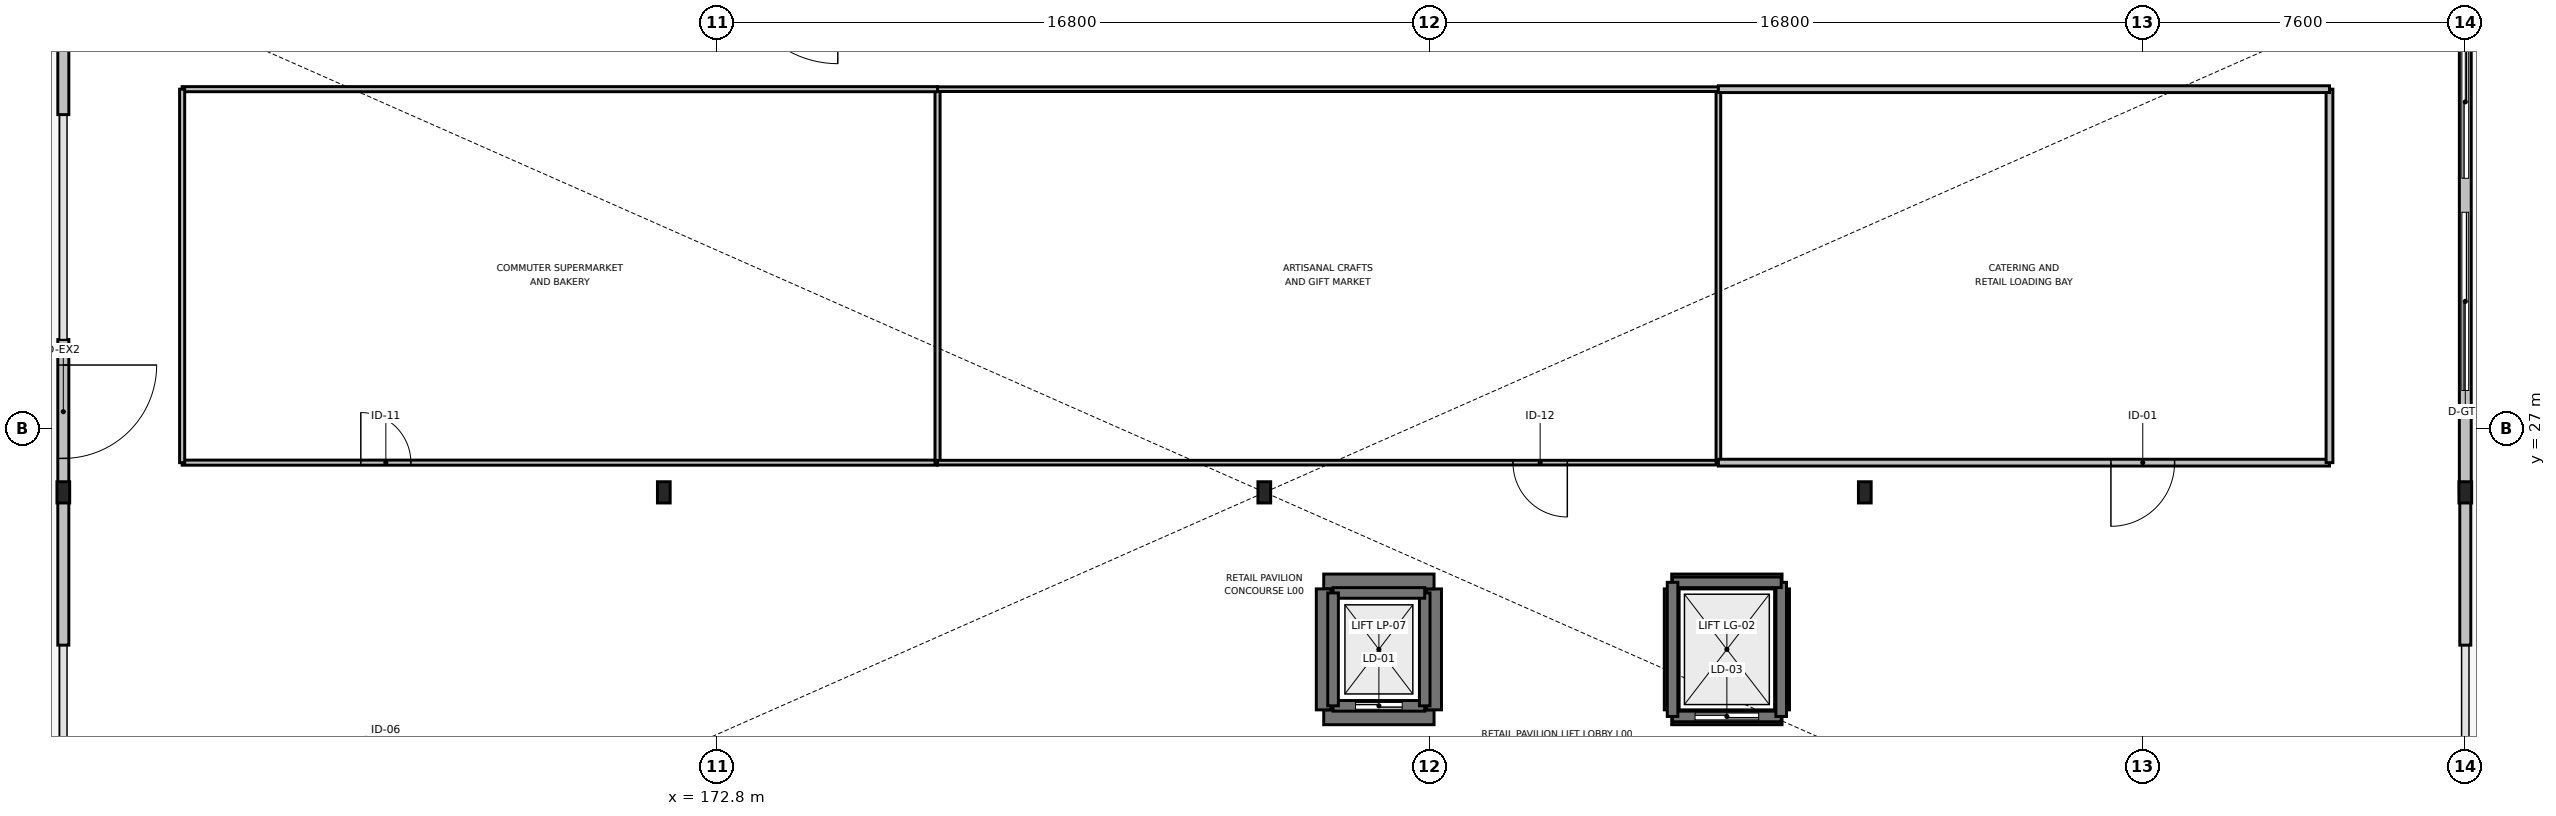
"""IFC4 building model, lengths in metres.
Left out: names, types, materials, properties, quantities, classifications, styles, units other than length and angle.
Written with IfcOpenShell. Run it as: python <this file> out.ifc"""

import sys

from ifc_helpers import new_model, si_unit, direction, frame, frame_2d, origin, origin_2d, place, context, subcontext, project, spatial, rectangle, i_section, extrude, element, fill, save


model = new_model("IFC4")
c1 = context("Model", 3, precision=1e-05, world=origin(), true_north=direction((0.0, 1.0)))
c2 = subcontext(c1, "Body", "Model", "MODEL_VIEW")
j1 = project(units=[si_unit("LENGTHUNIT", "METRE"), si_unit("PLANEANGLEUNIT", "RADIAN")], contexts=[c1])
p1 = place(None, origin())
s1 = spatial("IfcSite", under=j1, at=p1, CompositionType="ELEMENT")
p2 = place(p1, origin())
s2 = spatial("IfcBuilding", under=s1, at=p2, CompositionType="ELEMENT")
p3 = place(p2, origin())
s3 = spatial("IfcBuildingStorey", under=s2, at=p3, CompositionType="ELEMENT", Elevation=0.0)
for number, where, z_axis, x_axis in (
    (1, (157.4, 25.5, 0.0), (0.0, 0.0, 1.0), (1.0, 0.0, 0.0)),
    (2, (171.55, 25.5, 0.0), (0.0, 0.0, 1.0), (1.0, 0.0, 0.0)),
    (3, (185.7, 25.5, 0.0), (0.0, 0.0, 1.0), (1.0, 0.0, 0.0)),
    (4, (199.85, 25.5, 0.0), (0.0, 0.0, 1.0), (1.0, 0.0, 0.0)),
    (5, (214.0, 25.5, 0.0), (0.0, 0.0, 1.0), (1.0, 0.0, 0.0)),
):
    element("IfcColumn", number, at=place(p3, frame(where, z_axis=z_axis, x_axis=x_axis)), inside=s3, PredefinedType="COLUMN", context=c2, shape_type="SweptSolid", body=[
        extrude(i_section(OverallWidth=0.3, OverallDepth=0.5, WebThickness=0.014, FlangeThickness=0.028, FilletRadius=0.027, at=origin_2d()), origin(), (0.0, 0.0, 1.0), 5.4),
    ])
p4 = place(p3, frame((187.1, 20.2, -1.35), z_axis=(0.0, 0.0, 1.0), x_axis=(1.0, 0.0, 0.0)))
e6 = element("IfcWall", 6, at=p4, inside=s3, PredefinedType="SOLIDWALL", context=c2, shape_type="SweptSolid", body=[
    extrude(rectangle(XDim=2.6, YDim=0.35, at=frame_2d((1.3, 0.0))), origin(), (0.0, 0.0, 1.0), 1.35),
])
p5 = place(p3, frame((189.7, 20.375, -1.35), z_axis=(0.0, 0.0, 1.0), x_axis=(0.0, 1.0, 0.0)))
e7 = element("IfcWall", 7, at=p5, inside=s3, PredefinedType="SOLIDWALL", context=c2, shape_type="SweptSolid", body=[
    extrude(rectangle(XDim=2.85, YDim=0.35, at=frame_2d((1.425, 0.0))), origin(), (0.0, 0.0, 1.0), 1.35),
])
p6 = place(p3, frame((189.7, 23.4, -1.35), z_axis=(0.0, 0.0, 1.0), x_axis=(-1.0, 0.0, 0.0)))
e8 = element("IfcWall", 8, at=p6, inside=s3, PredefinedType="SOLIDWALL", context=c2, shape_type="SweptSolid", body=[
    extrude(rectangle(XDim=2.6, YDim=0.35, at=frame_2d((1.3, 0.0))), origin(), (0.0, 0.0, 1.0), 1.35),
])
p7 = place(p3, frame((187.1, 23.225, -1.35), z_axis=(0.0, 0.0, 1.0), x_axis=(0.0, -1.0, 0.0)))
e9 = element("IfcWall", 9, at=p7, inside=s3, PredefinedType="SOLIDWALL", context=c2, shape_type="SweptSolid", body=[
    extrude(rectangle(XDim=2.85, YDim=0.35, at=frame_2d((1.425, 0.0))), origin(), (0.0, 0.0, 1.0), 1.35),
])
p8 = place(p3, frame((195.3, 20.2, -1.35), z_axis=(0.0, 0.0, 1.0), x_axis=(1.0, 0.0, 0.0)))
e10 = element("IfcWall", 10, at=p8, inside=s3, PredefinedType="SOLIDWALL", context=c2, shape_type="SweptSolid", body=[
    extrude(rectangle(XDim=2.6, YDim=0.35, at=frame_2d((1.3, 0.0))), origin(), (0.0, 0.0, 1.0), 1.35),
])
p9 = place(p3, frame((197.9, 20.375, -1.35), z_axis=(0.0, 0.0, 1.0), x_axis=(0.0, 1.0, 0.0)))
e11 = element("IfcWall", 11, at=p9, inside=s3, PredefinedType="SOLIDWALL", context=c2, shape_type="SweptSolid", body=[
    extrude(rectangle(XDim=2.85, YDim=0.35, at=frame_2d((1.425, 0.0))), origin(), (0.0, 0.0, 1.0), 1.35),
])
p10 = place(p3, frame((197.9, 23.4, -1.35), z_axis=(0.0, 0.0, 1.0), x_axis=(-1.0, 0.0, 0.0)))
e12 = element("IfcWall", 12, at=p10, inside=s3, PredefinedType="SOLIDWALL", context=c2, shape_type="SweptSolid", body=[
    extrude(rectangle(XDim=2.6, YDim=0.35, at=frame_2d((1.3, 0.0))), origin(), (0.0, 0.0, 1.0), 1.35),
])
p11 = place(p3, frame((195.3, 23.225, -1.35), z_axis=(0.0, 0.0, 1.0), x_axis=(0.0, -1.0, 0.0)))
e13 = element("IfcWall", 13, at=p11, inside=s3, PredefinedType="SOLIDWALL", context=c2, shape_type="SweptSolid", body=[
    extrude(rectangle(XDim=2.85, YDim=0.35, at=frame_2d((1.425, 0.0))), origin(), (0.0, 0.0, 1.0), 1.35),
])
p12 = place(p3, frame((157.4, 21.9, 0.0), z_axis=(0.0, 0.0, 1.0), x_axis=(0.0, 1.0, 0.0)))
e14 = element("IfcWall", 14, at=p12, inside=s3, PredefinedType="STANDARD", context=c2, shape_type="SweptSolid", body=[
    extrude(rectangle(XDim=3.6, YDim=0.26, at=frame_2d((1.8, 0.0))), origin(), (0.0, 0.0, 1.0), 4.675),
])
p13 = place(p3, frame((157.4, 25.5, 0.0), z_axis=(0.0, 0.0, 1.0), x_axis=(0.0, 1.0, 0.0)))
e15 = element("IfcWall", 15, at=p13, inside=s3, PredefinedType="STANDARD", context=c2, shape_type="SweptSolid", body=[
    extrude(rectangle(XDim=3.6, YDim=0.26, at=frame_2d((1.8, 0.0))), origin(), (0.0, 0.0, 1.0), 4.675),
])
p14 = place(p13, frame((0.8, 0.0, 0.0)))
e16 = element("IfcOpeningElement", 16, at=p14, cuts=e15, PredefinedType="OPENING", context=c2, shape_type="SweptSolid", body=[
    extrude(rectangle(XDim=2.2, YDim=2.4, at=frame_2d((1.1, 1.2))), frame((0.0, 0.14, 0.0), z_axis=(0.0, -1.0, 0.0), x_axis=(1.0, 0.0, 0.0)), (0.0, 0.0, 1.0), 0.28),
])
p15 = place(p3, frame((157.4, 34.4, 0.0), z_axis=(0.0, 0.0, 1.0), x_axis=(0.0, 1.0, 0.0)))
e17 = element("IfcWall", 17, at=p15, inside=s3, PredefinedType="STANDARD", context=c2, shape_type="SweptSolid", body=[
    extrude(rectangle(XDim=3.47, YDim=0.26, at=frame_2d((1.735, 0.0))), origin(), (0.0, 0.0, 1.0), 4.675),
])
p16 = place(p3, frame((214.0, 21.9, 0.0), z_axis=(0.0, 0.0, 1.0), x_axis=(0.0, 1.0, 0.0)))
e18 = element("IfcWall", 18, at=p16, inside=s3, PredefinedType="STANDARD", context=c2, shape_type="SweptSolid", body=[
    extrude(rectangle(XDim=3.6, YDim=0.26, at=frame_2d((1.8, 0.0))), origin(), (0.0, 0.0, 1.0), 4.675),
])
p17 = place(p3, frame((214.0, 25.5, 0.0), z_axis=(0.0, 0.0, 1.0), x_axis=(0.0, 1.0, 0.0)))
e19 = element("IfcWall", 19, at=p17, inside=s3, PredefinedType="STANDARD", context=c2, shape_type="SweptSolid", body=[
    extrude(rectangle(XDim=12.37, YDim=0.28, at=frame_2d((6.185, 0.0))), origin(), (0.0, 0.0, 1.0), 4.675),
])
p18 = place(p17, frame((6.6, 0.0, 0.0), z_axis=(0.0, 0.0, 1.0), x_axis=(-1.0, 0.0, 0.0)))
e20 = element("IfcOpeningElement", 20, at=p18, cuts=e19, PredefinedType="OPENING", context=c2, shape_type="SweptSolid", body=[
    extrude(rectangle(XDim=4.2, YDim=4.0, at=frame_2d((2.1, 2.0))), frame((0.0, 0.15, 0.0), z_axis=(0.0, -1.0, 0.0), x_axis=(1.0, 0.0, 0.0)), (0.0, 0.0, 1.0), 0.3),
])
p19 = place(p17, frame((11.0, 0.0, 0.0), z_axis=(0.0, 0.0, 1.0), x_axis=(-1.0, 0.0, 0.0)))
e21 = element("IfcOpeningElement", 21, at=p19, cuts=e19, PredefinedType="OPENING", context=c2, shape_type="SweptSolid", body=[
    extrude(rectangle(XDim=3.6, YDim=3.4, at=frame_2d((1.8, 1.7))), frame((0.0, 0.15, 0.0), z_axis=(0.0, -1.0, 0.0), x_axis=(1.0, 0.0, 0.0)), (0.0, 0.0, 1.0), 0.3),
])
p20 = place(p3, frame((187.32, 20.47, 0.0), z_axis=(0.0, 0.0, 1.0), x_axis=(1.0, 0.0, 0.0)))
e22 = element("IfcWall", 22, at=p20, inside=s3, PredefinedType="SHEAR", context=c2, shape_type="SweptSolid", body=[
    extrude(rectangle(XDim=2.16, YDim=0.25, at=frame_2d((1.08, 0.0))), origin(), (0.0, 0.0, 1.0), 5.18),
])
p21 = place(p20, frame((0.53, 0.0, 0.0)))
e23 = element("IfcOpeningElement", 23, at=p21, cuts=e22, PredefinedType="OPENING", context=c2, shape_type="SweptSolid", body=[
    extrude(rectangle(XDim=1.1, YDim=2.2, at=frame_2d((0.55, 1.1))), frame((0.0, 0.135, 0.0), z_axis=(0.0, -1.0, 0.0), x_axis=(1.0, 0.0, 0.0)), (0.0, 0.0, 1.0), 0.27),
])
p22 = place(p3, frame((189.48, 20.47, 0.0), z_axis=(0.0, 0.0, 1.0), x_axis=(0.0, 1.0, 0.0)))
e24 = element("IfcWall", 24, at=p22, inside=s3, PredefinedType="SHEAR", context=c2, shape_type="SweptSolid", body=[
    extrude(rectangle(XDim=2.66, YDim=0.25, at=frame_2d((1.33, 0.0))), origin(), (0.0, 0.0, 1.0), 5.18),
])
p23 = place(p3, frame((189.48, 23.13, 0.0), z_axis=(0.0, 0.0, 1.0), x_axis=(-1.0, 0.0, 0.0)))
e25 = element("IfcWall", 25, at=p23, inside=s3, PredefinedType="SHEAR", context=c2, shape_type="SweptSolid", body=[
    extrude(rectangle(XDim=2.16, YDim=0.25, at=frame_2d((1.08, 0.0))), origin(), (0.0, 0.0, 1.0), 5.18),
])
p24 = place(p3, frame((187.32, 23.13, 0.0), z_axis=(0.0, 0.0, 1.0), x_axis=(0.0, -1.0, 0.0)))
e26 = element("IfcWall", 26, at=p24, inside=s3, PredefinedType="SHEAR", context=c2, shape_type="SweptSolid", body=[
    extrude(rectangle(XDim=2.66, YDim=0.25, at=frame_2d((1.33, 0.0))), origin(), (0.0, 0.0, 1.0), 5.18),
])
p25 = place(p3, frame((195.32, 20.22, 0.0), z_axis=(0.0, 0.0, 1.0), x_axis=(1.0, 0.0, 0.0)))
e27 = element("IfcWall", 27, at=p25, inside=s3, PredefinedType="SHEAR", context=c2, shape_type="SweptSolid", body=[
    extrude(rectangle(XDim=2.56, YDim=0.25, at=frame_2d((1.28, 0.0))), origin(), (0.0, 0.0, 1.0), 5.18),
])
p26 = place(p25, frame((0.53, 0.0, 0.0)))
e28 = element("IfcOpeningElement", 28, at=p26, cuts=e27, PredefinedType="OPENING", context=c2, shape_type="SweptSolid", body=[
    extrude(rectangle(XDim=1.5, YDim=2.3, at=frame_2d((0.75, 1.15))), frame((0.0, 0.135, 0.0), z_axis=(0.0, -1.0, 0.0), x_axis=(1.0, 0.0, 0.0)), (0.0, 0.0, 1.0), 0.27),
])
p27 = place(p3, frame((197.88, 20.22, 0.0), z_axis=(0.0, 0.0, 1.0), x_axis=(0.0, 1.0, 0.0)))
e29 = element("IfcWall", 29, at=p27, inside=s3, PredefinedType="SHEAR", context=c2, shape_type="SweptSolid", body=[
    extrude(rectangle(XDim=3.16, YDim=0.25, at=frame_2d((1.58, 0.0))), origin(), (0.0, 0.0, 1.0), 5.18),
])
p28 = place(p3, frame((197.88, 23.38, 0.0), z_axis=(0.0, 0.0, 1.0), x_axis=(-1.0, 0.0, 0.0)))
e30 = element("IfcWall", 30, at=p28, inside=s3, PredefinedType="SHEAR", context=c2, shape_type="SweptSolid", body=[
    extrude(rectangle(XDim=2.56, YDim=0.25, at=frame_2d((1.28, 0.0))), origin(), (0.0, 0.0, 1.0), 5.18),
])
p29 = place(p3, frame((195.32, 23.38, 0.0), z_axis=(0.0, 0.0, 1.0), x_axis=(0.0, -1.0, 0.0)))
e31 = element("IfcWall", 31, at=p29, inside=s3, PredefinedType="SHEAR", context=c2, shape_type="SweptSolid", body=[
    extrude(rectangle(XDim=3.16, YDim=0.25, at=frame_2d((1.58, 0.0))), origin(), (0.0, 0.0, 1.0), 5.18),
])
p30 = place(p3, frame((160.2, 26.2, 0.0), z_axis=(0.0, 0.0, 1.0), x_axis=(1.0, 0.0, 0.0)))
e32 = element("IfcWall", 32, at=p30, inside=s3, PredefinedType="PARTITIONING", context=c2, shape_type="SweptSolid", body=[
    extrude(rectangle(XDim=17.8, YDim=0.12, at=frame_2d((8.9, 0.0))), origin(), (0.0, 0.0, 1.0), 4.625),
])
p31 = place(p30, frame((4.21, 0.0, 0.0)))
e33 = element("IfcOpeningElement", 33, at=p31, cuts=e32, PredefinedType="OPENING", context=c2, shape_type="SweptSolid", body=[
    extrude(rectangle(XDim=1.18, YDim=2.18, at=frame_2d((0.59, 1.09))), frame((0.0, 0.07, 0.0), z_axis=(0.0, -1.0, 0.0), x_axis=(1.0, 0.0, 0.0)), (0.0, 0.0, 1.0), 0.14),
])
p32 = place(p3, frame((178.0, 26.2, 0.0), z_axis=(0.0, 0.0, 1.0), x_axis=(0.0, 1.0, 0.0)))
e34 = element("IfcWall", 34, at=p32, inside=s3, PredefinedType="PARTITIONING", context=c2, shape_type="SweptSolid", body=[
    extrude(rectangle(XDim=8.8, YDim=0.12, at=frame_2d((4.4, 0.0))), origin(), (0.0, 0.0, 1.0), 5.16),
])
p33 = place(p3, frame((178.0, 35.0, 0.0), z_axis=(0.0, 0.0, 1.0), x_axis=(-1.0, 0.0, 0.0)))
e35 = element("IfcWall", 35, at=p33, inside=s3, PredefinedType="PARTITIONING", context=c2, shape_type="SweptSolid", body=[
    extrude(rectangle(XDim=17.8, YDim=0.12, at=frame_2d((8.9, 0.0))), origin(), (0.0, 0.0, 1.0), 5.16),
])
p34 = place(p3, frame((160.2, 35.0, 0.0), z_axis=(0.0, 0.0, 1.0), x_axis=(0.0, -1.0, 0.0)))
e36 = element("IfcWall", 36, at=p34, inside=s3, PredefinedType="PARTITIONING", context=c2, shape_type="SweptSolid", body=[
    extrude(rectangle(XDim=8.8, YDim=0.12, at=frame_2d((4.4, 0.0))), origin(), (0.0, 0.0, 1.0), 5.16),
])
p35 = place(p3, frame((178.0, 26.2, 0.0), z_axis=(0.0, 0.0, 1.0), x_axis=(1.0, 0.0, 0.0)))
e37 = element("IfcWall", 37, at=p35, inside=s3, PredefinedType="MOVABLE", context=c2, shape_type="SweptSolid", body=[
    extrude(rectangle(XDim=18.4, YDim=0.11, at=frame_2d((9.2, 0.0))), origin(), (0.0, 0.0, 1.0), 4.625),
])
p36 = place(p35, frame((13.56, 0.0, 0.0)))
e38 = element("IfcOpeningElement", 38, at=p36, cuts=e37, PredefinedType="OPENING", context=c2, shape_type="SweptSolid", body=[
    extrude(rectangle(XDim=1.28, YDim=2.22, at=frame_2d((0.64, 1.11))), frame((0.0, 0.065, 0.0), z_axis=(0.0, -1.0, 0.0), x_axis=(1.0, 0.0, 0.0)), (0.0, 0.0, 1.0), 0.13),
])
p37 = place(p3, frame((196.4, 26.2, 0.0), z_axis=(0.0, 0.0, 1.0), x_axis=(0.0, 1.0, 0.0)))
e39 = element("IfcWall", 39, at=p37, inside=s3, PredefinedType="MOVABLE", context=c2, shape_type="SweptSolid", body=[
    extrude(rectangle(XDim=8.8, YDim=0.11, at=frame_2d((4.4, 0.0))), origin(), (0.0, 0.0, 1.0), 5.16),
])
p38 = place(p3, frame((196.4, 35.0, 0.0), z_axis=(0.0, 0.0, 1.0), x_axis=(-1.0, 0.0, 0.0)))
e40 = element("IfcWall", 40, at=p38, inside=s3, PredefinedType="MOVABLE", context=c2, shape_type="SweptSolid", body=[
    extrude(rectangle(XDim=18.4, YDim=0.11, at=frame_2d((9.2, 0.0))), origin(), (0.0, 0.0, 1.0), 5.16),
])
p39 = place(p3, frame((196.4, 26.2, 0.0), z_axis=(0.0, 0.0, 1.0), x_axis=(1.0, 0.0, 0.0)))
e41 = element("IfcWall", 41, at=p39, inside=s3, PredefinedType="PARTITIONING", context=c2, shape_type="SweptSolid", body=[
    extrude(rectangle(XDim=14.4, YDim=0.16, at=frame_2d((7.2, 0.0))), origin(), (0.0, 0.0, 1.0), 4.625),
])
p40 = place(p39, frame((10.75, 0.0, 0.0), z_axis=(0.0, 0.0, 1.0), x_axis=(-1.0, 0.0, 0.0)))
e42 = element("IfcOpeningElement", 42, at=p40, cuts=e41, PredefinedType="OPENING", context=c2, shape_type="SweptSolid", body=[
    extrude(rectangle(XDim=1.5, YDim=2.25, at=frame_2d((0.75, 1.125))), frame((0.0, 0.09, 0.0), z_axis=(0.0, -1.0, 0.0), x_axis=(1.0, 0.0, 0.0)), (0.0, 0.0, 1.0), 0.18),
])
p41 = place(p3, frame((210.8, 26.2, 0.0), z_axis=(0.0, 0.0, 1.0), x_axis=(0.0, 1.0, 0.0)))
e43 = element("IfcWall", 43, at=p41, inside=s3, PredefinedType="PARTITIONING", context=c2, shape_type="SweptSolid", body=[
    extrude(rectangle(XDim=8.8, YDim=0.16, at=frame_2d((4.4, 0.0))), origin(), (0.0, 0.0, 1.0), 5.16),
])
p42 = place(p3, frame((210.8, 35.0, 0.0), z_axis=(0.0, 0.0, 1.0), x_axis=(-1.0, 0.0, 0.0)))
e44 = element("IfcWall", 44, at=p42, inside=s3, PredefinedType="PARTITIONING", context=c2, shape_type="SweptSolid", body=[
    extrude(rectangle(XDim=14.4, YDim=0.16, at=frame_2d((7.2, 0.0))), origin(), (0.0, 0.0, 1.0), 5.16),
])
p43 = place(p14, origin())
e45 = element("IfcDoor", 45, at=p43, inside=s3, OperationType="SINGLE_SWING_RIGHT", PredefinedType="DOOR", context=c2, shape_type="SweptSolid", body=[
    extrude(rectangle(XDim=2.2, YDim=2.4, at=frame_2d((1.1, 1.2))), frame((0.0, 0.025, 0.0), z_axis=(0.0, -1.0, 0.0), x_axis=(1.0, 0.0, 0.0)), (0.0, 0.0, 1.0), 0.05),
])
fill(e16, e45)
p44 = place(p18, origin())
e46 = element("IfcDoor", 46, at=p44, inside=s3, OperationType="ROLLINGUP", PredefinedType="GATE", context=c2, shape_type="SweptSolid", body=[
    extrude(rectangle(XDim=4.2, YDim=4.0, at=frame_2d((2.1, 2.0))), frame((0.0, 0.025, 0.0), z_axis=(0.0, -1.0, 0.0), x_axis=(1.0, 0.0, 0.0)), (0.0, 0.0, 1.0), 0.05),
])
fill(e20, e46)
p45 = place(p19, origin())
e47 = element("IfcDoor", 47, at=p45, inside=s3, OperationType="ROLLINGUP", PredefinedType="GATE", context=c2, shape_type="SweptSolid", body=[
    extrude(rectangle(XDim=3.6, YDim=3.4, at=frame_2d((1.8, 1.7))), frame((0.0, 0.025, 0.0), z_axis=(0.0, -1.0, 0.0), x_axis=(1.0, 0.0, 0.0)), (0.0, 0.0, 1.0), 0.05),
])
fill(e21, e47)
p46 = place(p21, origin())
e48 = element("IfcDoor", 48, at=p46, inside=s3, OperationType="SLIDING_TO_LEFT", PredefinedType="DOOR", context=c2, shape_type="SweptSolid", body=[
    extrude(rectangle(XDim=1.1, YDim=2.2, at=frame_2d((0.55, 1.1))), frame((0.0, 0.025, 0.0), z_axis=(0.0, -1.0, 0.0), x_axis=(1.0, 0.0, 0.0)), (0.0, 0.0, 1.0), 0.05),
])
fill(e23, e48)
p47 = place(p26, origin())
e49 = element("IfcDoor", 49, at=p47, inside=s3, OperationType="SLIDING_TO_LEFT", PredefinedType="DOOR", context=c2, shape_type="SweptSolid", body=[
    extrude(rectangle(XDim=1.5, YDim=2.3, at=frame_2d((0.75, 1.15))), frame((0.0, 0.025, 0.0), z_axis=(0.0, -1.0, 0.0), x_axis=(1.0, 0.0, 0.0)), (0.0, 0.0, 1.0), 0.05),
])
fill(e28, e49)
p48 = place(p31, origin())
e50 = element("IfcDoor", 50, at=p48, inside=s3, OperationType="SINGLE_SWING_LEFT", PredefinedType="DOOR", context=c2, shape_type="SweptSolid", body=[
    extrude(rectangle(XDim=1.18, YDim=2.18, at=frame_2d((0.59, 1.09))), frame((0.0, 0.025, 0.0), z_axis=(0.0, -1.0, 0.0), x_axis=(1.0, 0.0, 0.0)), (0.0, 0.0, 1.0), 0.05),
])
fill(e33, e50)
p49 = place(p36, origin())
e51 = element("IfcDoor", 51, at=p49, inside=s3, OperationType="SINGLE_SWING_RIGHT", PredefinedType="DOOR", context=c2, shape_type="SweptSolid", body=[
    extrude(rectangle(XDim=1.28, YDim=2.22, at=frame_2d((0.64, 1.11))), frame((0.0, 0.025, 0.0), z_axis=(0.0, -1.0, 0.0), x_axis=(1.0, 0.0, 0.0)), (0.0, 0.0, 1.0), 0.05),
])
fill(e38, e51)
p50 = place(p40, origin())
e52 = element("IfcDoor", 52, at=p50, inside=s3, OperationType="SINGLE_SWING_LEFT", PredefinedType="DOOR", context=c2, shape_type="SweptSolid", body=[
    extrude(rectangle(XDim=1.5, YDim=2.25, at=frame_2d((0.75, 1.125))), frame((0.0, 0.025, 0.0), z_axis=(0.0, -1.0, 0.0), x_axis=(1.0, 0.0, 0.0)), (0.0, 0.0, 1.0), 0.05),
])
fill(e42, e52)
save(model, sys.argv[1])
